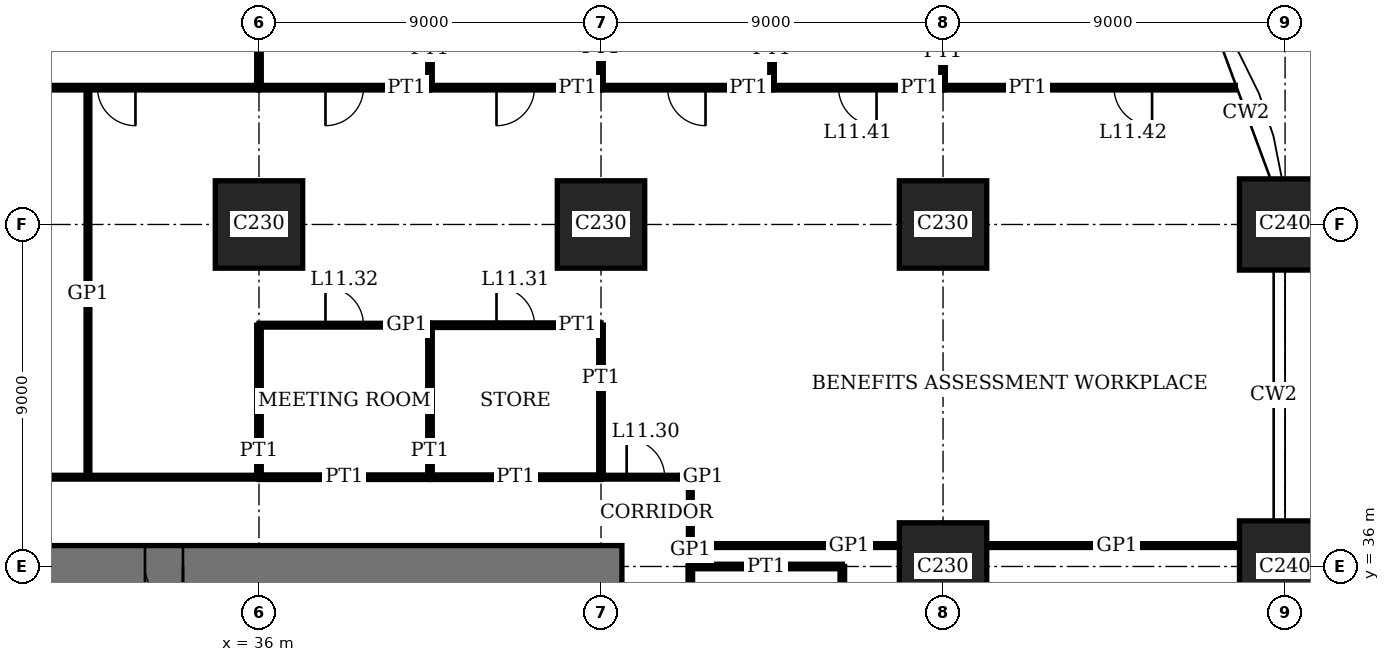
"""IFC4 building model, lengths in metres.
Left out: names, types, materials, properties, quantities, classifications, styles, units other than length and angle.
Written with IfcOpenShell. Run it as: python <this file> out.ifc"""

import sys

from ifc_helpers import new_model, si_unit, direction, frame, frame_2d, origin, origin_2d, place, context, subcontext, project, spatial, rectangle, extrude, element, fill, save


model = new_model("IFC4")
c1 = context("Model", 3, precision=1e-05, world=origin(), true_north=direction((0.0, 1.0)))
c2 = subcontext(c1, "Body", "Model", "MODEL_VIEW")
j1 = project(units=[si_unit("LENGTHUNIT", "METRE"), si_unit("PLANEANGLEUNIT", "RADIAN")], contexts=[c1])
p1 = place(None, origin())
s1 = spatial("IfcSite", under=j1, at=p1, CompositionType="ELEMENT")
p2 = place(p1, origin())
s2 = spatial("IfcBuilding", under=s1, at=p2, CompositionType="ELEMENT")
p3 = place(p2, frame((0.0, 0.0, 47.8)))
s3 = spatial("IfcBuildingStorey", under=s2, at=p3, CompositionType="ELEMENT", Elevation=47.8)
for number, where, z_axis, x_axis in (
    (1, (36.0, 45.0, 0.0), (0.0, 0.0, 1.0), (1.0, 0.0, 0.0)),
    (2, (45.0, 45.0, 0.0), (0.0, 0.0, 1.0), (1.0, 0.0, 0.0)),
    (3, (54.0, 36.0, 0.0), (0.0, 0.0, 1.0), (1.0, 0.0, 0.0)),
    (4, (54.0, 45.0, 0.0), (0.0, 0.0, 1.0), (1.0, 0.0, 0.0)),
):
    element("IfcColumn", number, at=place(p3, frame(where, z_axis=z_axis, x_axis=x_axis)), inside=s3, PredefinedType="COLUMN", context=c2, shape_type="SweptSolid", body=[
        extrude(rectangle(XDim=2.3, YDim=2.3, at=origin_2d()), origin(), (0.0, 0.0, 1.0), 4.0),
    ])
for number, where, z_axis, x_axis in (
    (5, (63.0, 36.0, 0.0), (0.0, 0.0, 1.0), (1.0, 0.0, 0.0)),
    (6, (63.0, 45.0, 0.0), (0.0, 0.0, 1.0), (1.0, 0.0, 0.0)),
):
    element("IfcColumn", number, at=place(p3, frame(where, z_axis=z_axis, x_axis=x_axis)), inside=s3, PredefinedType="COLUMN", context=c2, shape_type="SweptSolid", body=[
        extrude(rectangle(XDim=2.4, YDim=2.4, at=origin_2d()), origin(), (0.0, 0.0, 1.0), 4.0),
    ])
p4 = place(p3, frame((45.55, 36.0, 0.0), z_axis=(0.0, 0.0, 1.0), x_axis=(-1.0, 0.0, 0.0)))
e7 = element("IfcWall", 7, at=p4, inside=s3, PredefinedType="SHEAR", context=c2, shape_type="SweptSolid", body=[
    extrude(rectangle(XDim=28.1, YDim=1.1, at=frame_2d((14.05, 0.0))), origin(), (0.0, 0.0, 1.0), 4.0),
])
p5 = place(p4, frame((11.55, 0.0, 0.0)))
e8 = element("IfcOpeningElement", 8, at=p5, cuts=e7, PredefinedType="OPENING", context=c2, shape_type="SweptSolid", body=[
    extrude(rectangle(XDim=1.0, YDim=2.4, at=frame_2d((0.5, 1.2))), frame((0.0, 0.56, 0.0), z_axis=(0.0, -1.0, 0.0), x_axis=(1.0, 0.0, 0.0)), (0.0, 0.0, 1.0), 1.12),
])
p6 = place(p4, frame((16.55, 0.0, 0.0)))
e9 = element("IfcOpeningElement", 9, at=p6, cuts=e7, PredefinedType="OPENING", context=c2, shape_type="SweptSolid", body=[
    extrude(rectangle(XDim=1.0, YDim=2.4, at=frame_2d((0.5, 1.2))), frame((0.0, 0.56, 0.0), z_axis=(0.0, -1.0, 0.0), x_axis=(1.0, 0.0, 0.0)), (0.0, 0.0, 1.0), 1.12),
])
p7 = place(p4, frame((20.0, 0.0, 0.0)))
e10 = element("IfcOpeningElement", 10, at=p7, cuts=e7, PredefinedType="OPENING", context=c2, shape_type="SweptSolid", body=[
    extrude(rectangle(XDim=1.1, YDim=2.4, at=frame_2d((0.55, 1.2))), frame((0.0, 0.56, 0.0), z_axis=(0.0, -1.0, 0.0), x_axis=(1.0, 0.0, 0.0)), (0.0, 0.0, 1.0), 1.12),
])
p8 = place(p4, frame((24.05, 0.0, 0.0)))
e11 = element("IfcOpeningElement", 11, at=p8, cuts=e7, PredefinedType="OPENING", context=c2, shape_type="SweptSolid", body=[
    extrude(rectangle(XDim=1.0, YDim=2.4, at=frame_2d((0.5, 1.2))), frame((0.0, 0.56, 0.0), z_axis=(0.0, -1.0, 0.0), x_axis=(1.0, 0.0, 0.0)), (0.0, 0.0, 1.0), 1.12),
])
p9 = place(p3, frame((47.35, 36.0, 0.0), z_axis=(0.0, 0.0, 1.0), x_axis=(1.0, 0.0, 0.0)))
e12 = element("IfcWall", 12, at=p9, inside=s3, PredefinedType="PARTITIONING", context=c2, shape_type="SweptSolid", body=[
    extrude(rectangle(XDim=4.0, YDim=0.12, at=frame_2d((2.0, 0.0))), origin(), (0.0, 0.0, 1.0), 3.05),
])
p10 = place(p3, frame((47.35, 36.55, 0.0), z_axis=(0.0, 0.0, 1.0), x_axis=(1.0, 0.0, 0.0)))
e13 = element("IfcWall", 13, at=p10, inside=s3, PredefinedType="PARTITIONING", context=c2, shape_type="SweptSolid", body=[
    extrude(rectangle(XDim=5.5, YDim=0.1, at=frame_2d((2.75, 0.0))), origin(), (0.0, 0.0, 1.0), 3.75),
])
p11 = place(p3, frame((55.15, 36.55, 0.0), z_axis=(0.0, 0.0, 1.0), x_axis=(1.0, 0.0, 0.0)))
e14 = element("IfcWall", 14, at=p11, inside=s3, PredefinedType="PARTITIONING", context=c2, shape_type="SweptSolid", body=[
    extrude(rectangle(XDim=6.65, YDim=0.1, at=frame_2d((3.325, 0.0))), origin(), (0.0, 0.0, 1.0), 3.75),
])
for number, where, z_axis, x_axis in (
    (15, (36.0, 38.35, 0.0), (0.0, 0.0, 1.0), (1.0, 0.0, 0.0)),
    (16, (40.5, 38.35, 0.0), (0.0, 0.0, 1.0), (1.0, 0.0, 0.0)),
):
    element("IfcWall", number, at=place(p3, frame(where, z_axis=z_axis, x_axis=x_axis)), inside=s3, PredefinedType="PARTITIONING", context=c2, shape_type="SweptSolid", body=[
        extrude(rectangle(XDim=4.5, YDim=0.12, at=frame_2d((2.25, 0.0))), origin(), (0.0, 0.0, 1.0), 3.75),
    ])
p12 = place(p3, frame((15.65, 38.35, 0.0), z_axis=(0.0, 0.0, 1.0), x_axis=(1.0, 0.0, 0.0)))
e17 = element("IfcWall", 17, at=p12, inside=s3, PredefinedType="PARTITIONING", context=c2, shape_type="SweptSolid", body=[
    extrude(rectangle(XDim=20.35, YDim=0.1, at=frame_2d((10.175, 0.0))), origin(), (0.0, 0.0, 1.0), 3.75),
])
p13 = place(p12, frame((9.675, 0.0, 0.0)))
e18 = element("IfcOpeningElement", 18, at=p13, cuts=e17, PredefinedType="OPENING", context=c2, shape_type="SweptSolid", body=[
    extrude(rectangle(XDim=1.0, YDim=2.4, at=frame_2d((0.5, 1.2))), frame((0.0, 0.06, 0.0), z_axis=(0.0, -1.0, 0.0), x_axis=(1.0, 0.0, 0.0)), (0.0, 0.0, 1.0), 0.12),
])
p14 = place(p3, frame((45.0, 38.35, 0.0), z_axis=(0.0, 0.0, 1.0), x_axis=(1.0, 0.0, 0.0)))
e19 = element("IfcWall", 19, at=p14, inside=s3, PredefinedType="PARTITIONING", context=c2, shape_type="SweptSolid", body=[
    extrude(rectangle(XDim=2.35, YDim=0.1, at=frame_2d((1.175, 0.0))), origin(), (0.0, 0.0, 1.0), 3.75),
])
p15 = place(p14, frame((0.675, 0.0, 0.0)))
e20 = element("IfcOpeningElement", 20, at=p15, cuts=e19, PredefinedType="OPENING", context=c2, shape_type="SweptSolid", body=[
    extrude(rectangle(XDim=1.0, YDim=2.4, at=frame_2d((0.5, 1.2))), frame((0.0, 0.06, 0.0), z_axis=(0.0, -1.0, 0.0), x_axis=(1.0, 0.0, 0.0)), (0.0, 0.0, 1.0), 0.12),
])
p16 = place(p3, frame((40.5, 42.35, 0.0), z_axis=(0.0, 0.0, 1.0), x_axis=(1.0, 0.0, 0.0)))
e21 = element("IfcWall", 21, at=p16, inside=s3, PredefinedType="PARTITIONING", context=c2, shape_type="SweptSolid", body=[
    extrude(rectangle(XDim=4.5, YDim=0.12, at=frame_2d((2.25, 0.0))), origin(), (0.0, 0.0, 1.0), 3.75),
])
p17 = place(p16, frame((1.75, 0.0, 0.0)))
e22 = element("IfcOpeningElement", 22, at=p17, cuts=e21, PredefinedType="OPENING", context=c2, shape_type="SweptSolid", body=[
    extrude(rectangle(XDim=1.0, YDim=2.4, at=frame_2d((0.5, 1.2))), frame((0.0, 0.07, 0.0), z_axis=(0.0, -1.0, 0.0), x_axis=(1.0, 0.0, 0.0)), (0.0, 0.0, 1.0), 0.14),
])
p18 = place(p3, frame((36.0, 42.35, 0.0), z_axis=(0.0, 0.0, 1.0), x_axis=(1.0, 0.0, 0.0)))
e23 = element("IfcWall", 23, at=p18, inside=s3, PredefinedType="PARTITIONING", context=c2, shape_type="SweptSolid", body=[
    extrude(rectangle(XDim=4.5, YDim=0.1, at=frame_2d((2.25, 0.0))), origin(), (0.0, 0.0, 1.0), 3.75),
])
p19 = place(p18, frame((1.75, 0.0, 0.0)))
e24 = element("IfcOpeningElement", 24, at=p19, cuts=e23, PredefinedType="OPENING", context=c2, shape_type="SweptSolid", body=[
    extrude(rectangle(XDim=1.0, YDim=2.4, at=frame_2d((0.5, 1.2))), frame((0.0, 0.06, 0.0), z_axis=(0.0, -1.0, 0.0), x_axis=(1.0, 0.0, 0.0)), (0.0, 0.0, 1.0), 0.12),
])
p20 = place(p3, frame((27.0, 48.6, 0.0), z_axis=(0.0, 0.0, 1.0), x_axis=(1.0, 0.0, 0.0)))
e25 = element("IfcWall", 25, at=p20, inside=s3, PredefinedType="PARTITIONING", context=c2, shape_type="SweptSolid", body=[
    extrude(rectangle(XDim=9.0, YDim=0.12, at=frame_2d((4.5, 0.0))), origin(), (0.0, 0.0, 1.0), 3.75),
])
p21 = place(p20, frame((4.75, 0.0, 0.0)))
e26 = element("IfcOpeningElement", 26, at=p21, cuts=e25, PredefinedType="OPENING", context=c2, shape_type="SweptSolid", body=[
    extrude(rectangle(XDim=1.0, YDim=2.4, at=frame_2d((0.5, 1.2))), frame((0.0, 0.07, 0.0), z_axis=(0.0, -1.0, 0.0), x_axis=(1.0, 0.0, 0.0)), (0.0, 0.0, 1.0), 0.14),
])
p22 = place(p3, frame((36.0, 48.6, 0.0), z_axis=(0.0, 0.0, 1.0), x_axis=(1.0, 0.0, 0.0)))
e27 = element("IfcWall", 27, at=p22, inside=s3, PredefinedType="PARTITIONING", context=c2, shape_type="SweptSolid", body=[
    extrude(rectangle(XDim=4.5, YDim=0.12, at=frame_2d((2.25, 0.0))), origin(), (0.0, 0.0, 1.0), 3.75),
])
p23 = place(p22, frame((1.75, 0.0, 0.0)))
e28 = element("IfcOpeningElement", 28, at=p23, cuts=e27, PredefinedType="OPENING", context=c2, shape_type="SweptSolid", body=[
    extrude(rectangle(XDim=1.0, YDim=2.4, at=frame_2d((0.5, 1.2))), frame((0.0, 0.07, 0.0), z_axis=(0.0, -1.0, 0.0), x_axis=(1.0, 0.0, 0.0)), (0.0, 0.0, 1.0), 0.14),
])
p24 = place(p3, frame((40.5, 48.6, 0.0), z_axis=(0.0, 0.0, 1.0), x_axis=(1.0, 0.0, 0.0)))
e29 = element("IfcWall", 29, at=p24, inside=s3, PredefinedType="PARTITIONING", context=c2, shape_type="SweptSolid", body=[
    extrude(rectangle(XDim=4.5, YDim=0.12, at=frame_2d((2.25, 0.0))), origin(), (0.0, 0.0, 1.0), 3.75),
])
p25 = place(p24, frame((1.75, 0.0, 0.0)))
e30 = element("IfcOpeningElement", 30, at=p25, cuts=e29, PredefinedType="OPENING", context=c2, shape_type="SweptSolid", body=[
    extrude(rectangle(XDim=1.0, YDim=2.4, at=frame_2d((0.5, 1.2))), frame((0.0, 0.07, 0.0), z_axis=(0.0, -1.0, 0.0), x_axis=(1.0, 0.0, 0.0)), (0.0, 0.0, 1.0), 0.14),
])
p26 = place(p3, frame((45.0, 48.6, 0.0), z_axis=(0.0, 0.0, 1.0), x_axis=(1.0, 0.0, 0.0)))
e31 = element("IfcWall", 31, at=p26, inside=s3, PredefinedType="PARTITIONING", context=c2, shape_type="SweptSolid", body=[
    extrude(rectangle(XDim=4.5, YDim=0.12, at=frame_2d((2.25, 0.0))), origin(), (0.0, 0.0, 1.0), 3.75),
])
p27 = place(p26, frame((1.75, 0.0, 0.0)))
e32 = element("IfcOpeningElement", 32, at=p27, cuts=e31, PredefinedType="OPENING", context=c2, shape_type="SweptSolid", body=[
    extrude(rectangle(XDim=1.0, YDim=2.4, at=frame_2d((0.5, 1.2))), frame((0.0, 0.07, 0.0), z_axis=(0.0, -1.0, 0.0), x_axis=(1.0, 0.0, 0.0)), (0.0, 0.0, 1.0), 0.14),
])
p28 = place(p3, frame((49.5, 48.6, 0.0), z_axis=(0.0, 0.0, 1.0), x_axis=(1.0, 0.0, 0.0)))
e33 = element("IfcWall", 33, at=p28, inside=s3, PredefinedType="PARTITIONING", context=c2, shape_type="SweptSolid", body=[
    extrude(rectangle(XDim=4.5, YDim=0.12, at=frame_2d((2.25, 0.0))), origin(), (0.0, 0.0, 1.0), 3.75),
])
p29 = place(p28, frame((1.75, 0.0, 0.0)))
e34 = element("IfcOpeningElement", 34, at=p29, cuts=e33, PredefinedType="OPENING", context=c2, shape_type="SweptSolid", body=[
    extrude(rectangle(XDim=1.0, YDim=2.4, at=frame_2d((0.5, 1.2))), frame((0.0, 0.07, 0.0), z_axis=(0.0, -1.0, 0.0), x_axis=(1.0, 0.0, 0.0)), (0.0, 0.0, 1.0), 0.14),
])
p30 = place(p3, frame((54.0, 48.6, 0.0), z_axis=(0.0, 0.0, 1.0), x_axis=(1.0, 0.0, 0.0)))
e35 = element("IfcWall", 35, at=p30, inside=s3, PredefinedType="PARTITIONING", context=c2, shape_type="SweptSolid", body=[
    extrude(rectangle(XDim=7.69, YDim=0.12, at=frame_2d((3.845, 0.0))), origin(), (0.0, 0.0, 1.0), 3.75),
])
p31 = place(p30, frame((4.5, 0.0, 0.0)))
e36 = element("IfcOpeningElement", 36, at=p31, cuts=e35, PredefinedType="OPENING", context=c2, shape_type="SweptSolid", body=[
    extrude(rectangle(XDim=1.0, YDim=2.4, at=frame_2d((0.5, 1.2))), frame((0.0, 0.07, 0.0), z_axis=(0.0, -1.0, 0.0), x_axis=(1.0, 0.0, 0.0)), (0.0, 0.0, 1.0), 0.14),
])
p32 = place(p3, frame((31.5, 38.35, 0.0), z_axis=(0.0, 0.0, 1.0), x_axis=(0.0, 1.0, 0.0)))
e37 = element("IfcWall", 37, at=p32, inside=s3, PredefinedType="PARTITIONING", context=c2, shape_type="SweptSolid", body=[
    extrude(rectangle(XDim=10.26, YDim=0.1, at=frame_2d((5.13, 0.0))), origin(), (0.0, 0.0, 1.0), 3.75),
])
p33 = place(p3, frame((36.0, 48.6, 0.0), z_axis=(0.0, 0.0, 1.0), x_axis=(0.0, 1.0, 0.0)))
e38 = element("IfcWall", 38, at=p33, inside=s3, PredefinedType="PARTITIONING", context=c2, shape_type="SweptSolid", body=[
    extrude(rectangle(XDim=4.2, YDim=0.12, at=frame_2d((2.1, 0.0))), origin(), (0.0, 0.0, 1.0), 3.05),
])
p34 = place(p3, frame((36.0, 38.35, 0.0), z_axis=(0.0, 0.0, 1.0), x_axis=(0.0, 1.0, 0.0)))
e39 = element("IfcWall", 39, at=p34, inside=s3, PredefinedType="PARTITIONING", context=c2, shape_type="SweptSolid", body=[
    extrude(rectangle(XDim=4.0, YDim=0.12, at=frame_2d((2.0, 0.0))), origin(), (0.0, 0.0, 1.0), 3.05),
])
p35 = place(p3, frame((40.5, 48.6, 0.0), z_axis=(0.0, 0.0, 1.0), x_axis=(0.0, 1.0, 0.0)))
e40 = element("IfcWall", 40, at=p35, inside=s3, PredefinedType="PARTITIONING", context=c2, shape_type="SweptSolid", body=[
    extrude(rectangle(XDim=5.09, YDim=0.12, at=frame_2d((2.545, 0.0))), origin(), (0.0, 0.0, 1.0), 3.75),
])
p36 = place(p3, frame((40.5, 38.35, 0.0), z_axis=(0.0, 0.0, 1.0), x_axis=(0.0, 1.0, 0.0)))
e41 = element("IfcWall", 41, at=p36, inside=s3, PredefinedType="PARTITIONING", context=c2, shape_type="SweptSolid", body=[
    extrude(rectangle(XDim=4.0, YDim=0.12, at=frame_2d((2.0, 0.0))), origin(), (0.0, 0.0, 1.0), 3.75),
])
p37 = place(p3, frame((45.0, 48.6, 0.0), z_axis=(0.0, 0.0, 1.0), x_axis=(0.0, 1.0, 0.0)))
e42 = element("IfcWall", 42, at=p37, inside=s3, PredefinedType="PARTITIONING", context=c2, shape_type="SweptSolid", body=[
    extrude(rectangle(XDim=4.2, YDim=0.12, at=frame_2d((2.1, 0.0))), origin(), (0.0, 0.0, 1.0), 3.05),
])
p38 = place(p3, frame((45.0, 38.35, 0.0), z_axis=(0.0, 0.0, 1.0), x_axis=(0.0, 1.0, 0.0)))
e43 = element("IfcWall", 43, at=p38, inside=s3, PredefinedType="PARTITIONING", context=c2, shape_type="SweptSolid", body=[
    extrude(rectangle(XDim=4.0, YDim=0.12, at=frame_2d((2.0, 0.0))), origin(), (0.0, 0.0, 1.0), 3.05),
])
p39 = place(p3, frame((47.35, 31.5, 0.0), z_axis=(0.0, 0.0, 1.0), x_axis=(0.0, 1.0, 0.0)))
e44 = element("IfcWall", 44, at=p39, inside=s3, PredefinedType="PARTITIONING", context=c2, shape_type="SweptSolid", body=[
    extrude(rectangle(XDim=4.5, YDim=0.12, at=frame_2d((2.25, 0.0))), origin(), (0.0, 0.0, 1.0), 3.75),
])
p40 = place(p3, frame((47.35, 36.0, 0.0), z_axis=(0.0, 0.0, 1.0), x_axis=(0.0, 1.0, 0.0)))
e45 = element("IfcWall", 45, at=p40, inside=s3, PredefinedType="PARTITIONING", context=c2, shape_type="SweptSolid", body=[
    extrude(rectangle(XDim=2.35, YDim=0.1, at=frame_2d((1.175, 0.0))), origin(), (0.0, 0.0, 1.0), 3.75),
])
p41 = place(p3, frame((49.5, 48.6, 0.0), z_axis=(0.0, 0.0, 1.0), x_axis=(0.0, 1.0, 0.0)))
e46 = element("IfcWall", 46, at=p41, inside=s3, PredefinedType="PARTITIONING", context=c2, shape_type="SweptSolid", body=[
    extrude(rectangle(XDim=5.09, YDim=0.12, at=frame_2d((2.545, 0.0))), origin(), (0.0, 0.0, 1.0), 3.75),
])
p42 = place(p3, frame((51.35, 31.5, 0.0), z_axis=(0.0, 0.0, 1.0), x_axis=(0.0, 1.0, 0.0)))
e47 = element("IfcWall", 47, at=p42, inside=s3, PredefinedType="PARTITIONING", context=c2, shape_type="SweptSolid", body=[
    extrude(rectangle(XDim=4.5, YDim=0.12, at=frame_2d((2.25, 0.0))), origin(), (0.0, 0.0, 1.0), 3.75),
])
p43 = place(p42, frame((1.75, 0.0, 0.0)))
e48 = element("IfcOpeningElement", 48, at=p43, cuts=e47, PredefinedType="OPENING", context=c2, shape_type="SweptSolid", body=[
    extrude(rectangle(XDim=1.0, YDim=2.4, at=frame_2d((0.5, 1.2))), frame((0.0, 0.07, 0.0), z_axis=(0.0, -1.0, 0.0), x_axis=(1.0, 0.0, 0.0)), (0.0, 0.0, 1.0), 0.14),
])
p44 = place(p3, frame((54.0, 48.6, 0.0), z_axis=(0.0, 0.0, 1.0), x_axis=(0.0, 1.0, 0.0)))
e49 = element("IfcWall", 49, at=p44, inside=s3, PredefinedType="PARTITIONING", context=c2, shape_type="SweptSolid", body=[
    extrude(rectangle(XDim=4.2, YDim=0.12, at=frame_2d((2.1, 0.0))), origin(), (0.0, 0.0, 1.0), 3.05),
])
p45 = place(p5, origin())
e50 = element("IfcDoor", 50, at=p45, inside=s3, OperationType="SINGLE_SWING_RIGHT", PredefinedType="DOOR", context=c2, shape_type="SweptSolid", body=[
    extrude(rectangle(XDim=1.0, YDim=2.4, at=frame_2d((0.5, 1.2))), frame((0.0, 0.025, 0.0), z_axis=(0.0, -1.0, 0.0), x_axis=(1.0, 0.0, 0.0)), (0.0, 0.0, 1.0), 0.05),
    extrude(rectangle(XDim=0.04, YDim=2.4, at=frame_2d((0.02, 1.2))), frame((0.0, 0.4, 0.0), z_axis=(0.0, -1.0, 0.0), x_axis=(1.0, 0.0, 0.0)), (0.0, 0.0, 1.0), 0.8),
    extrude(rectangle(XDim=0.04, YDim=2.4, at=frame_2d((0.98, 1.2))), frame((0.0, 0.4, 0.0), z_axis=(0.0, -1.0, 0.0), x_axis=(1.0, 0.0, 0.0)), (0.0, 0.0, 1.0), 0.8),
    extrude(rectangle(XDim=1.0, YDim=0.04, at=frame_2d((0.5, 2.38))), frame((0.0, 0.4, 0.0), z_axis=(0.0, -1.0, 0.0), x_axis=(1.0, 0.0, 0.0)), (0.0, 0.0, 1.0), 0.8),
])
fill(e8, e50)
p46 = place(p15, origin())
e51 = element("IfcDoor", 51, at=p46, inside=s3, OperationType="SINGLE_SWING_RIGHT", PredefinedType="DOOR", context=c2, shape_type="SweptSolid", body=[
    extrude(rectangle(XDim=1.0, YDim=2.4, at=frame_2d((0.5, 1.2))), frame((0.0, 0.02, 0.0), z_axis=(0.0, -1.0, 0.0), x_axis=(1.0, 0.0, 0.0)), (0.0, 0.0, 1.0), 0.04),
])
fill(e20, e51)
p47 = place(p17, origin())
e52 = element("IfcDoor", 52, at=p47, inside=s3, OperationType="SINGLE_SWING_RIGHT", PredefinedType="DOOR", context=c2, shape_type="SweptSolid", body=[
    extrude(rectangle(XDim=1.0, YDim=2.4, at=frame_2d((0.5, 1.2))), frame((0.0, 0.025, 0.0), z_axis=(0.0, -1.0, 0.0), x_axis=(1.0, 0.0, 0.0)), (0.0, 0.0, 1.0), 0.05),
])
fill(e22, e52)
p48 = place(p19, origin())
e53 = element("IfcDoor", 53, at=p48, inside=s3, OperationType="SINGLE_SWING_RIGHT", PredefinedType="DOOR", context=c2, shape_type="SweptSolid", body=[
    extrude(rectangle(XDim=1.0, YDim=2.4, at=frame_2d((0.5, 1.2))), frame((0.0, 0.02, 0.0), z_axis=(0.0, -1.0, 0.0), x_axis=(1.0, 0.0, 0.0)), (0.0, 0.0, 1.0), 0.04),
])
fill(e24, e53)
p49 = place(p21, origin())
e54 = element("IfcDoor", 54, at=p49, inside=s3, OperationType="SINGLE_SWING_RIGHT", PredefinedType="DOOR", context=c2, shape_type="SweptSolid", body=[
    extrude(rectangle(XDim=1.0, YDim=2.4, at=frame_2d((0.5, 1.2))), frame((0.0, 0.025, 0.0), z_axis=(0.0, -1.0, 0.0), x_axis=(1.0, 0.0, 0.0)), (0.0, 0.0, 1.0), 0.05),
])
fill(e26, e54)
p50 = place(p23, origin())
e55 = element("IfcDoor", 55, at=p50, inside=s3, OperationType="SINGLE_SWING_LEFT", PredefinedType="DOOR", context=c2, shape_type="SweptSolid", body=[
    extrude(rectangle(XDim=1.0, YDim=2.4, at=frame_2d((0.5, 1.2))), frame((0.0, 0.025, 0.0), z_axis=(0.0, -1.0, 0.0), x_axis=(1.0, 0.0, 0.0)), (0.0, 0.0, 1.0), 0.05),
])
fill(e28, e55)
p51 = place(p25, origin())
e56 = element("IfcDoor", 56, at=p51, inside=s3, OperationType="SINGLE_SWING_LEFT", PredefinedType="DOOR", context=c2, shape_type="SweptSolid", body=[
    extrude(rectangle(XDim=1.0, YDim=2.4, at=frame_2d((0.5, 1.2))), frame((0.0, 0.025, 0.0), z_axis=(0.0, -1.0, 0.0), x_axis=(1.0, 0.0, 0.0)), (0.0, 0.0, 1.0), 0.05),
])
fill(e30, e56)
p52 = place(p27, origin())
e57 = element("IfcDoor", 57, at=p52, inside=s3, OperationType="SINGLE_SWING_RIGHT", PredefinedType="DOOR", context=c2, shape_type="SweptSolid", body=[
    extrude(rectangle(XDim=1.0, YDim=2.4, at=frame_2d((0.5, 1.2))), frame((0.0, 0.025, 0.0), z_axis=(0.0, -1.0, 0.0), x_axis=(1.0, 0.0, 0.0)), (0.0, 0.0, 1.0), 0.05),
])
fill(e32, e57)
p53 = place(p29, origin())
e58 = element("IfcDoor", 58, at=p53, inside=s3, OperationType="SINGLE_SWING_RIGHT", PredefinedType="DOOR", context=c2, shape_type="SweptSolid", body=[
    extrude(rectangle(XDim=1.0, YDim=2.4, at=frame_2d((0.5, 1.2))), frame((0.0, 0.025, 0.0), z_axis=(0.0, -1.0, 0.0), x_axis=(1.0, 0.0, 0.0)), (0.0, 0.0, 1.0), 0.05),
])
fill(e34, e58)
p54 = place(p31, origin())
e59 = element("IfcDoor", 59, at=p54, inside=s3, OperationType="SINGLE_SWING_RIGHT", PredefinedType="DOOR", context=c2, shape_type="SweptSolid", body=[
    extrude(rectangle(XDim=1.0, YDim=2.4, at=frame_2d((0.5, 1.2))), frame((0.0, 0.025, 0.0), z_axis=(0.0, -1.0, 0.0), x_axis=(1.0, 0.0, 0.0)), (0.0, 0.0, 1.0), 0.05),
])
fill(e36, e59)
save(model, sys.argv[1])
